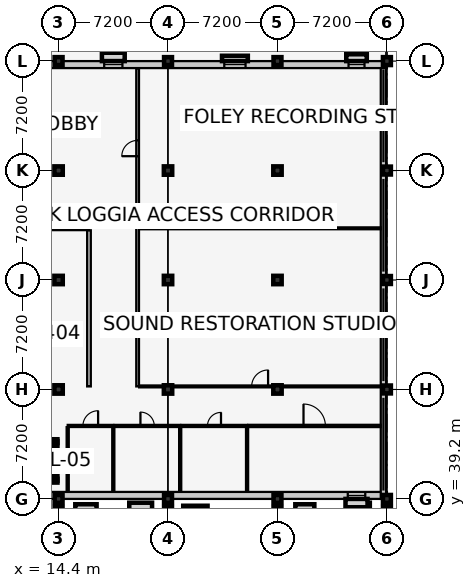
"""IFC4 building model, lengths in metres.
Left out: names, types, materials, properties, quantities, classifications, styles, units other than length and angle.
Written with IfcOpenShell. Run it as: python <this file> out.ifc"""

import sys

from ifc_helpers import new_model, si_unit, direction, frame, frame_2d, origin, origin_2d, place, context, subcontext, project, spatial, rectangle, extrude, element, fill, save


model = new_model("IFC4")
c1 = context("Model", 3, precision=1e-05, world=origin(), true_north=direction((0.0, 1.0)))
c2 = subcontext(c1, "Body", "Model", "MODEL_VIEW")
j1 = project(units=[si_unit("LENGTHUNIT", "METRE"), si_unit("PLANEANGLEUNIT", "RADIAN")], contexts=[c1])
p1 = place(None, origin())
s1 = spatial("IfcSite", under=j1, at=p1, CompositionType="ELEMENT")
p2 = place(p1, origin())
s2 = spatial("IfcBuilding", under=s1, at=p2, CompositionType="ELEMENT")
p3 = place(p2, frame((0.0, 0.0, 5.4)))
s3 = spatial("IfcBuildingStorey", under=s2, at=p3, CompositionType="ELEMENT", Elevation=5.4)
for number, where, z_axis, x_axis in (
    (1, (14.4, 38.4, 0.0), (0.0, 0.0, 1.0), (1.0, 0.0, 0.0)),
    (2, (21.6, 38.4, 0.0), (0.0, 0.0, 1.0), (1.0, 0.0, 0.0)),
    (3, (28.8, 38.4, 0.0), (0.0, 0.0, 1.0), (1.0, 0.0, 0.0)),
    (4, (36.0, 38.4, 0.0), (0.0, 0.0, 1.0), (1.0, 0.0, 0.0)),
    (5, (14.4, 39.2, 0.0), (0.0, 0.0, 1.0), (1.0, 0.0, 0.0)),
):
    element("IfcColumn", number, at=place(p3, frame(where, z_axis=z_axis, x_axis=x_axis)), inside=s3, PredefinedType="COLUMN", context=c2, shape_type="SweptSolid", body=[
        extrude(rectangle(XDim=0.52, YDim=0.52, at=origin_2d()), origin(), (0.0, 0.0, 1.0), 4.2),
    ])
for number, where, z_axis, x_axis in (
    (6, (14.4, 46.4, 0.0), (0.0, 0.0, 1.0), (1.0, 0.0, 0.0)),
    (7, (14.4, 53.6, 0.0), (0.0, 0.0, 1.0), (1.0, 0.0, 0.0)),
    (8, (14.4, 60.8, 0.0), (0.0, 0.0, 1.0), (1.0, 0.0, 0.0)),
):
    element("IfcColumn", number, at=place(p3, frame(where, z_axis=z_axis, x_axis=x_axis)), inside=s3, PredefinedType="COLUMN", context=c2, shape_type="SweptSolid", body=[
        extrude(rectangle(XDim=0.55, YDim=0.55, at=origin_2d()), origin(), (0.0, 0.0, 1.0), 4.2),
    ])
for number, where, z_axis, x_axis in (
    (9, (14.4, 68.0, 0.0), (0.0, 0.0, 1.0), (1.0, 0.0, 0.0)),
    (10, (21.6, 39.2, 0.0), (0.0, 0.0, 1.0), (1.0, 0.0, 0.0)),
):
    element("IfcColumn", number, at=place(p3, frame(where, z_axis=z_axis, x_axis=x_axis)), inside=s3, PredefinedType="COLUMN", context=c2, shape_type="SweptSolid", body=[
        extrude(rectangle(XDim=0.52, YDim=0.52, at=origin_2d()), origin(), (0.0, 0.0, 1.0), 4.2),
    ])
for number, where, z_axis, x_axis in (
    (11, (21.6, 46.4, 0.0), (0.0, 0.0, 1.0), (1.0, 0.0, 0.0)),
    (12, (21.6, 53.6, 0.0), (0.0, 0.0, 1.0), (1.0, 0.0, 0.0)),
    (13, (21.6, 60.8, 0.0), (0.0, 0.0, 1.0), (1.0, 0.0, 0.0)),
):
    element("IfcColumn", number, at=place(p3, frame(where, z_axis=z_axis, x_axis=x_axis)), inside=s3, PredefinedType="COLUMN", context=c2, shape_type="SweptSolid", body=[
        extrude(rectangle(XDim=0.55, YDim=0.55, at=origin_2d()), origin(), (0.0, 0.0, 1.0), 4.2),
    ])
for number, where, z_axis, x_axis in (
    (14, (21.6, 68.0, 0.0), (0.0, 0.0, 1.0), (1.0, 0.0, 0.0)),
    (15, (28.8, 39.2, 0.0), (0.0, 0.0, 1.0), (1.0, 0.0, 0.0)),
):
    element("IfcColumn", number, at=place(p3, frame(where, z_axis=z_axis, x_axis=x_axis)), inside=s3, PredefinedType="COLUMN", context=c2, shape_type="SweptSolid", body=[
        extrude(rectangle(XDim=0.52, YDim=0.52, at=origin_2d()), origin(), (0.0, 0.0, 1.0), 4.2),
    ])
for number, where, z_axis, x_axis in (
    (16, (28.8, 46.4, 0.0), (0.0, 0.0, 1.0), (1.0, 0.0, 0.0)),
    (17, (28.8, 53.6, 0.0), (0.0, 0.0, 1.0), (1.0, 0.0, 0.0)),
    (18, (28.8, 60.8, 0.0), (0.0, 0.0, 1.0), (1.0, 0.0, 0.0)),
):
    element("IfcColumn", number, at=place(p3, frame(where, z_axis=z_axis, x_axis=x_axis)), inside=s3, PredefinedType="COLUMN", context=c2, shape_type="SweptSolid", body=[
        extrude(rectangle(XDim=0.55, YDim=0.55, at=origin_2d()), origin(), (0.0, 0.0, 1.0), 4.2),
    ])
for number, where, z_axis, x_axis in (
    (19, (28.8, 68.0, 0.0), (0.0, 0.0, 1.0), (1.0, 0.0, 0.0)),
    (20, (36.0, 39.2, 0.0), (0.0, 0.0, 1.0), (1.0, 0.0, 0.0)),
    (21, (36.0, 46.4, 0.0), (0.0, 0.0, 1.0), (1.0, 0.0, 0.0)),
    (22, (36.0, 53.6, 0.0), (0.0, 0.0, 1.0), (1.0, 0.0, 0.0)),
    (23, (36.0, 60.8, 0.0), (0.0, 0.0, 1.0), (1.0, 0.0, 0.0)),
    (24, (36.0, 68.0, 0.0), (0.0, 0.0, 1.0), (1.0, 0.0, 0.0)),
):
    element("IfcColumn", number, at=place(p3, frame(where, z_axis=z_axis, x_axis=x_axis)), inside=s3, PredefinedType="COLUMN", context=c2, shape_type="SweptSolid", body=[
        extrude(rectangle(XDim=0.52, YDim=0.52, at=origin_2d()), origin(), (0.0, 0.0, 1.0), 4.2),
    ])
p4 = place(p3, frame((36.0, 39.43, 0.0), z_axis=(0.0, 0.0, 1.0), x_axis=(-1.0, 0.0, 0.0)))
e25 = element("IfcWall", 25, at=p4, inside=s3, PredefinedType="SOLIDWALL", context=c2, shape_type="SweptSolid", body=[
    extrude(rectangle(XDim=36.0, YDim=0.46, at=frame_2d((18.0, 0.0))), origin(), (0.0, 0.0, 1.0), 3.235),
])
p5 = place(p4, frame((1.425, 0.0, 0.9)))
e26 = element("IfcOpeningElement", 26, at=p5, cuts=e25, PredefinedType="OPENING", context=c2, shape_type="SweptSolid", body=[
    extrude(rectangle(XDim=1.15, YDim=1.6, at=frame_2d((0.575, 0.8))), frame((0.0, 0.242, 0.0), z_axis=(0.0, -1.0, 0.0), x_axis=(1.0, 0.0, 0.0)), (0.0, 0.0, 1.0), 0.484),
])
p6 = place(p4, frame((25.38, 0.0, 0.9)))
e27 = element("IfcOpeningElement", 27, at=p6, cuts=e25, PredefinedType="OPENING", context=c2, shape_type="SweptSolid", body=[
    extrude(rectangle(XDim=1.24, YDim=1.75, at=frame_2d((0.62, 0.875))), frame((0.0, 0.242, 0.0), z_axis=(0.0, -1.0, 0.0), x_axis=(1.0, 0.0, 0.0)), (0.0, 0.0, 1.0), 0.484),
])
p7 = place(p3, frame((35.77, 68.0, 0.0), z_axis=(0.0, 0.0, 1.0), x_axis=(0.0, -1.0, 0.0)))
e28 = element("IfcWall", 28, at=p7, inside=s3, PredefinedType="SOLIDWALL", context=c2, shape_type="SweptSolid", body=[
    extrude(rectangle(XDim=28.8, YDim=0.35, at=frame_2d((14.4, 0.0))), origin(), (0.0, 0.0, 1.0), 0.85),
])
p8 = place(p3, frame((0.0, 67.77, 0.0), z_axis=(0.0, 0.0, 1.0), x_axis=(1.0, 0.0, 0.0)))
e29 = element("IfcWall", 29, at=p8, inside=s3, PredefinedType="SOLIDWALL", context=c2, shape_type="SweptSolid", body=[
    extrude(rectangle(XDim=36.0, YDim=0.46, at=frame_2d((18.0, 0.0))), origin(), (0.0, 0.0, 1.0), 3.235),
])
p9 = place(p8, frame((10.0, 0.0, 0.0)))
e30 = element("IfcOpeningElement", 30, at=p9, cuts=e29, PredefinedType="OPENING", context=c2, shape_type="SweptSolid", body=[
    extrude(rectangle(XDim=1.6, YDim=2.2, at=frame_2d((0.8, 1.1))), frame((0.0, 0.242, 0.0), z_axis=(0.0, -1.0, 0.0), x_axis=(1.0, 0.0, 0.0)), (0.0, 0.0, 1.0), 0.484),
])
p10 = place(p8, frame((1.25, 0.0, 0.9)))
e31 = element("IfcOpeningElement", 31, at=p10, cuts=e29, PredefinedType="OPENING", context=c2, shape_type="SweptSolid", body=[
    extrude(rectangle(XDim=1.5, YDim=1.75, at=frame_2d((0.75, 0.875))), frame((0.0, 0.242, 0.0), z_axis=(0.0, -1.0, 0.0), x_axis=(1.0, 0.0, 0.0)), (0.0, 0.0, 1.0), 0.484),
])
p11 = place(p8, frame((17.4, 0.0, 0.9)))
e32 = element("IfcOpeningElement", 32, at=p11, cuts=e29, PredefinedType="OPENING", context=c2, shape_type="SweptSolid", body=[
    extrude(rectangle(XDim=1.2, YDim=1.35, at=frame_2d((0.6, 0.675))), frame((0.0, 0.242, 0.0), z_axis=(0.0, -1.0, 0.0), x_axis=(1.0, 0.0, 0.0)), (0.0, 0.0, 1.0), 0.484),
])
p12 = place(p8, frame((25.3, 0.0, 0.9)))
e33 = element("IfcOpeningElement", 33, at=p12, cuts=e29, PredefinedType="OPENING", context=c2, shape_type="SweptSolid", body=[
    extrude(rectangle(XDim=1.4, YDim=1.35, at=frame_2d((0.7, 0.675))), frame((0.0, 0.242, 0.0), z_axis=(0.0, -1.0, 0.0), x_axis=(1.0, 0.0, 0.0)), (0.0, 0.0, 1.0), 0.484),
])
p13 = place(p8, frame((33.475, 0.0, 0.9)))
e34 = element("IfcOpeningElement", 34, at=p13, cuts=e29, PredefinedType="OPENING", context=c2, shape_type="SweptSolid", body=[
    extrude(rectangle(XDim=1.05, YDim=1.45, at=frame_2d((0.525, 0.725))), frame((0.0, 0.242, 0.0), z_axis=(0.0, -1.0, 0.0), x_axis=(1.0, 0.0, 0.0)), (0.0, 0.0, 1.0), 0.484),
])
p14 = place(p3, frame((12.275, 40.4, 0.0), z_axis=(0.0, 0.0, 1.0), x_axis=(1.0, 0.0, 0.0)))
e35 = element("IfcWall", 35, at=p14, inside=s3, PredefinedType="SHEAR", context=c2, shape_type="SweptSolid", body=[
    extrude(rectangle(XDim=2.05, YDim=0.25, at=frame_2d((1.025, 0.0))), origin(), (0.0, 0.0, 1.0), 3.94),
])
p15 = place(p3, frame((14.325, 43.0, 0.0), z_axis=(0.0, 0.0, 1.0), x_axis=(-1.0, 0.0, 0.0)))
e36 = element("IfcWall", 36, at=p15, inside=s3, PredefinedType="SHEAR", context=c2, shape_type="SweptSolid", body=[
    extrude(rectangle(XDim=2.05, YDim=0.25, at=frame_2d((1.025, 0.0))), origin(), (0.0, 0.0, 1.0), 3.94),
])
p16 = place(p15, frame((0.55, 0.0, 0.0)))
e37 = element("IfcOpeningElement", 37, at=p16, cuts=e36, PredefinedType="OPENING", context=c2, shape_type="SweptSolid", body=[
    extrude(rectangle(XDim=0.95, YDim=2.1, at=frame_2d((0.475, 1.05))), frame((0.0, 0.137, 0.0), z_axis=(0.0, -1.0, 0.0), x_axis=(1.0, 0.0, 0.0)), (0.0, 0.0, 1.0), 0.274),
])
p17 = place(p3, frame((14.2, 40.4, 0.0), z_axis=(0.0, 0.0, 1.0), x_axis=(0.0, 1.0, 0.0)))
e38 = element("IfcWall", 38, at=p17, inside=s3, PredefinedType="SHEAR", context=c2, shape_type="SweptSolid", body=[
    extrude(rectangle(XDim=2.6, YDim=0.25, at=frame_2d((1.3, 0.0))), origin(), (0.0, 0.0, 1.0), 3.94),
])
p18 = place(p3, frame((19.6, 46.6, 0.0), z_axis=(0.0, 0.0, 1.0), x_axis=(0.0, 1.0, 0.0)))
e39 = element("IfcWall", 39, at=p18, inside=s3, PredefinedType="PARTITIONING", context=c2, shape_type="SweptSolid", body=[
    extrude(rectangle(XDim=20.93, YDim=0.18, at=frame_2d((10.465, 0.0))), origin(), (0.0, 0.0, 1.0), 3.94),
])
p19 = place(p18, frame((15.145, 0.0, 0.0)))
e40 = element("IfcOpeningElement", 40, at=p19, cuts=e39, PredefinedType="OPENING", context=c2, shape_type="SweptSolid", body=[
    extrude(rectangle(XDim=1.04, YDim=2.15, at=frame_2d((0.52, 1.075))), frame((0.0, 0.102, 0.0), z_axis=(0.0, -1.0, 0.0), x_axis=(1.0, 0.0, 0.0)), (0.0, 0.0, 1.0), 0.204),
])
p20 = place(p3, frame((0.47, 57.0, 0.0), z_axis=(0.0, 0.0, 1.0), x_axis=(1.0, 0.0, 0.0)))
e41 = element("IfcWall", 41, at=p20, inside=s3, PredefinedType="PARTITIONING", context=c2, shape_type="SweptSolid", body=[
    extrude(rectangle(XDim=15.93, YDim=0.24, at=frame_2d((7.965, 0.0))), origin(), (0.0, 0.0, 1.0), 3.94),
])
p21 = place(p20, frame((7.085, 0.0, 0.0)))
e42 = element("IfcOpeningElement", 42, at=p21, cuts=e41, PredefinedType="OPENING", context=c2, shape_type="SweptSolid", body=[
    extrude(rectangle(XDim=1.76, YDim=2.3, at=frame_2d((0.88, 1.15))), frame((0.0, 0.132, 0.0), z_axis=(0.0, -1.0, 0.0), x_axis=(1.0, 0.0, 0.0)), (0.0, 0.0, 1.0), 0.264),
])
p22 = place(p3, frame((16.4, 46.6, 0.0), z_axis=(0.0, 0.0, 1.0), x_axis=(0.0, 1.0, 0.0)))
e43 = element("IfcWall", 43, at=p22, inside=s3, PredefinedType="PARTITIONING", context=c2, shape_type="SweptSolid", body=[
    extrude(rectangle(XDim=10.27, YDim=0.24, at=frame_2d((5.135, 0.0))), origin(), (0.0, 0.0, 1.0), 3.94),
])
p23 = place(p3, frame((19.7, 46.6, 0.0), z_axis=(0.0, 0.0, 1.0), x_axis=(1.0, 0.0, 0.0)))
e44 = element("IfcWall", 44, at=p23, inside=s3, PredefinedType="PARTITIONING", context=c2, shape_type="SweptSolid", body=[
    extrude(rectangle(XDim=15.885, YDim=0.125, at=frame_2d((7.942, 0.0))), origin(), (0.0, 0.0, 1.0), 3.065),
])
p24 = place(p23, frame((7.403, 0.0, 0.0)))
e45 = element("IfcOpeningElement", 45, at=p24, cuts=e44, PredefinedType="OPENING", context=c2, shape_type="SweptSolid", body=[
    extrude(rectangle(XDim=1.08, YDim=2.15, at=frame_2d((0.54, 1.075))), frame((0.0, 0.074, 0.0), z_axis=(0.0, -1.0, 0.0), x_axis=(1.0, 0.0, 0.0)), (0.0, 0.0, 1.0), 0.149),
])
p25 = place(p3, frame((19.7, 57.0, 0.0), z_axis=(0.0, 0.0, 1.0), x_axis=(1.0, 0.0, 0.0)))
e46 = element("IfcWall", 46, at=p25, inside=s3, PredefinedType="PARTITIONING", context=c2, shape_type="SweptSolid", body=[
    extrude(rectangle(XDim=15.885, YDim=0.125, at=frame_2d((7.942, 0.0))), origin(), (0.0, 0.0, 1.0), 3.94),
])
p26 = place(p3, frame((15.0, 44.0, 0.0), z_axis=(0.0, 0.0, 1.0), x_axis=(1.0, 0.0, 0.0)))
e47 = element("IfcWall", 47, at=p26, inside=s3, PredefinedType="PARTITIONING", context=c2, shape_type="SweptSolid", body=[
    extrude(rectangle(XDim=3.0, YDim=0.14, at=frame_2d((1.5, 0.0))), origin(), (0.0, 0.0, 1.0), 3.94),
])
p27 = place(p26, frame((1.0, 0.0, 0.0)))
e48 = element("IfcOpeningElement", 48, at=p27, cuts=e47, PredefinedType="OPENING", context=c2, shape_type="SweptSolid", body=[
    extrude(rectangle(XDim=1.0, YDim=2.1, at=frame_2d((0.5, 1.05))), frame((0.0, 0.082, 0.0), z_axis=(0.0, -1.0, 0.0), x_axis=(1.0, 0.0, 0.0)), (0.0, 0.0, 1.0), 0.164),
])
p28 = place(p3, frame((15.0, 39.67, 0.0), z_axis=(0.0, 0.0, 1.0), x_axis=(0.0, 1.0, 0.0)))
e49 = element("IfcWall", 49, at=p28, inside=s3, PredefinedType="PARTITIONING", context=c2, shape_type="SweptSolid", body=[
    extrude(rectangle(XDim=4.25, YDim=0.14, at=frame_2d((2.125, 0.0))), origin(), (0.0, 0.0, 1.0), 3.94),
])
p29 = place(p3, frame((18.0, 39.67, 0.0), z_axis=(0.0, 0.0, 1.0), x_axis=(0.0, 1.0, 0.0)))
e50 = element("IfcWall", 50, at=p29, inside=s3, PredefinedType="PARTITIONING", context=c2, shape_type="SweptSolid", body=[
    extrude(rectangle(XDim=4.25, YDim=0.14, at=frame_2d((2.125, 0.0))), origin(), (0.0, 0.0, 1.0), 3.695),
])
p30 = place(p3, frame((18.08, 44.0, 0.0), z_axis=(0.0, 0.0, 1.0), x_axis=(1.0, 0.0, 0.0)))
e51 = element("IfcWall", 51, at=p30, inside=s3, PredefinedType="PARTITIONING", context=c2, shape_type="SweptSolid", body=[
    extrude(rectangle(XDim=4.32, YDim=0.14, at=frame_2d((2.16, 0.0))), origin(), (0.0, 0.0, 1.0), 3.94),
])
p31 = place(p30, frame((1.705, 0.0, 0.0)))
e52 = element("IfcOpeningElement", 52, at=p31, cuts=e51, PredefinedType="OPENING", context=c2, shape_type="SweptSolid", body=[
    extrude(rectangle(XDim=0.91, YDim=2.06, at=frame_2d((0.455, 1.03))), frame((0.0, 0.082, 0.0), z_axis=(0.0, -1.0, 0.0), x_axis=(1.0, 0.0, 0.0)), (0.0, 0.0, 1.0), 0.164),
])
p32 = place(p3, frame((22.4, 39.67, 0.0), z_axis=(0.0, 0.0, 1.0), x_axis=(0.0, 1.0, 0.0)))
e53 = element("IfcWall", 53, at=p32, inside=s3, PredefinedType="PARTITIONING", context=c2, shape_type="SweptSolid", body=[
    extrude(rectangle(XDim=4.25, YDim=0.14, at=frame_2d((2.125, 0.0))), origin(), (0.0, 0.0, 1.0), 3.94),
])
p33 = place(p3, frame((22.48, 44.0, 0.0), z_axis=(0.0, 0.0, 1.0), x_axis=(1.0, 0.0, 0.0)))
e54 = element("IfcWall", 54, at=p33, inside=s3, PredefinedType="PARTITIONING", context=c2, shape_type="SweptSolid", body=[
    extrude(rectangle(XDim=4.32, YDim=0.14, at=frame_2d((2.16, 0.0))), origin(), (0.0, 0.0, 1.0), 3.94),
])
p34 = place(p33, frame((1.715, 0.0, 0.0)))
e55 = element("IfcOpeningElement", 55, at=p34, cuts=e54, PredefinedType="OPENING", context=c2, shape_type="SweptSolid", body=[
    extrude(rectangle(XDim=0.89, YDim=2.05, at=frame_2d((0.445, 1.025))), frame((0.0, 0.082, 0.0), z_axis=(0.0, -1.0, 0.0), x_axis=(1.0, 0.0, 0.0)), (0.0, 0.0, 1.0), 0.164),
])
p35 = place(p3, frame((26.8, 39.67, 0.0), z_axis=(0.0, 0.0, 1.0), x_axis=(0.0, 1.0, 0.0)))
e56 = element("IfcWall", 56, at=p35, inside=s3, PredefinedType="PARTITIONING", context=c2, shape_type="SweptSolid", body=[
    extrude(rectangle(XDim=4.25, YDim=0.14, at=frame_2d((2.125, 0.0))), origin(), (0.0, 0.0, 1.0), 3.94),
])
p36 = place(p3, frame((26.88, 44.0, 0.0), z_axis=(0.0, 0.0, 1.0), x_axis=(1.0, 0.0, 0.0)))
e57 = element("IfcWall", 57, at=p36, inside=s3, PredefinedType="PARTITIONING", context=c2, shape_type="SweptSolid", body=[
    extrude(rectangle(XDim=8.705, YDim=0.15, at=frame_2d((4.353, 0.0))), origin(), (0.0, 0.0, 1.0), 3.94),
])
p37 = place(p36, frame((3.633, 0.0, 0.0)))
e58 = element("IfcOpeningElement", 58, at=p37, cuts=e57, PredefinedType="OPENING", context=c2, shape_type="SweptSolid", body=[
    extrude(rectangle(XDim=1.44, YDim=2.2, at=frame_2d((0.72, 1.1))), frame((0.0, 0.087, 0.0), z_axis=(0.0, -1.0, 0.0), x_axis=(1.0, 0.0, 0.0)), (0.0, 0.0, 1.0), 0.174),
])
p38 = place(p5, origin())
e59 = element("IfcWindow", 59, at=p38, inside=s3, PartitioningType="SINGLE_PANEL", PredefinedType="WINDOW", context=c2, shape_type="SweptSolid", body=[
    extrude(rectangle(XDim=1.15, YDim=1.6, at=frame_2d((0.575, 0.8))), frame((0.0, 0.03, 0.0), z_axis=(0.0, -1.0, 0.0), x_axis=(1.0, 0.0, 0.0)), (0.0, 0.0, 1.0), 0.06),
])
fill(e26, e59)
p39 = place(p11, origin())
e60 = element("IfcWindow", 60, at=p39, inside=s3, PartitioningType="SINGLE_PANEL", PredefinedType="WINDOW", context=c2, shape_type="SweptSolid", body=[
    extrude(rectangle(XDim=1.2, YDim=1.35, at=frame_2d((0.6, 0.675))), frame((0.0, 0.03, 0.0), z_axis=(0.0, -1.0, 0.0), x_axis=(1.0, 0.0, 0.0)), (0.0, 0.0, 1.0), 0.06),
])
fill(e32, e60)
p40 = place(p12, origin())
e61 = element("IfcWindow", 61, at=p40, inside=s3, PartitioningType="SINGLE_PANEL", PredefinedType="WINDOW", context=c2, shape_type="SweptSolid", body=[
    extrude(rectangle(XDim=1.4, YDim=1.35, at=frame_2d((0.7, 0.675))), frame((0.0, 0.03, 0.0), z_axis=(0.0, -1.0, 0.0), x_axis=(1.0, 0.0, 0.0)), (0.0, 0.0, 1.0), 0.06),
])
fill(e33, e61)
p41 = place(p13, origin())
e62 = element("IfcWindow", 62, at=p41, inside=s3, PartitioningType="SINGLE_PANEL", PredefinedType="WINDOW", context=c2, shape_type="SweptSolid", body=[
    extrude(rectangle(XDim=1.05, YDim=1.45, at=frame_2d((0.525, 0.725))), frame((0.0, 0.03, 0.0), z_axis=(0.0, -1.0, 0.0), x_axis=(1.0, 0.0, 0.0)), (0.0, 0.0, 1.0), 0.06),
])
fill(e34, e62)
p42 = place(p24, origin())
e63 = element("IfcDoor", 63, at=p42, inside=s3, OperationType="SINGLE_SWING_RIGHT", PredefinedType="DOOR", context=c2, shape_type="SweptSolid", body=[
    extrude(rectangle(XDim=1.08, YDim=2.15, at=frame_2d((0.54, 1.075))), frame((0.0, 0.025, 0.0), z_axis=(0.0, -1.0, 0.0), x_axis=(1.0, 0.0, 0.0)), (0.0, 0.0, 1.0), 0.05),
])
fill(e45, e63)
p43 = place(p19, origin())
e64 = element("IfcDoor", 64, at=p43, inside=s3, OperationType="SINGLE_SWING_LEFT", PredefinedType="DOOR", context=c2, shape_type="SweptSolid", body=[
    extrude(rectangle(XDim=1.04, YDim=2.15, at=frame_2d((0.52, 1.075))), frame((0.0, 0.025, 0.0), z_axis=(0.0, -1.0, 0.0), x_axis=(1.0, 0.0, 0.0)), (0.0, 0.0, 1.0), 0.05),
])
fill(e40, e64)
p44 = place(p27, origin())
e65 = element("IfcDoor", 65, at=p44, inside=s3, OperationType="SINGLE_SWING_RIGHT", PredefinedType="DOOR", context=c2, shape_type="SweptSolid", body=[
    extrude(rectangle(XDim=1.0, YDim=2.1, at=frame_2d((0.5, 1.05))), frame((0.0, 0.025, 0.0), z_axis=(0.0, -1.0, 0.0), x_axis=(1.0, 0.0, 0.0)), (0.0, 0.0, 1.0), 0.05),
])
fill(e48, e65)
p45 = place(p31, origin())
e66 = element("IfcDoor", 66, at=p45, inside=s3, OperationType="SINGLE_SWING_LEFT", PredefinedType="DOOR", context=c2, shape_type="SweptSolid", body=[
    extrude(rectangle(XDim=0.91, YDim=2.06, at=frame_2d((0.455, 1.03))), frame((0.0, 0.025, 0.0), z_axis=(0.0, -1.0, 0.0), x_axis=(1.0, 0.0, 0.0)), (0.0, 0.0, 1.0), 0.05),
])
fill(e52, e66)
p46 = place(p34, origin())
e67 = element("IfcDoor", 67, at=p46, inside=s3, OperationType="SINGLE_SWING_RIGHT", PredefinedType="DOOR", context=c2, shape_type="SweptSolid", body=[
    extrude(rectangle(XDim=0.89, YDim=2.05, at=frame_2d((0.445, 1.025))), frame((0.0, 0.025, 0.0), z_axis=(0.0, -1.0, 0.0), x_axis=(1.0, 0.0, 0.0)), (0.0, 0.0, 1.0), 0.05),
])
fill(e55, e67)
p47 = place(p37, origin())
e68 = element("IfcDoor", 68, at=p47, inside=s3, OperationType="SINGLE_SWING_LEFT", PredefinedType="DOOR", context=c2, shape_type="SweptSolid", body=[
    extrude(rectangle(XDim=1.44, YDim=2.2, at=frame_2d((0.72, 1.1))), frame((0.0, 0.025, 0.0), z_axis=(0.0, -1.0, 0.0), x_axis=(1.0, 0.0, 0.0)), (0.0, 0.0, 1.0), 0.05),
])
fill(e58, e68)
save(model, sys.argv[1])
